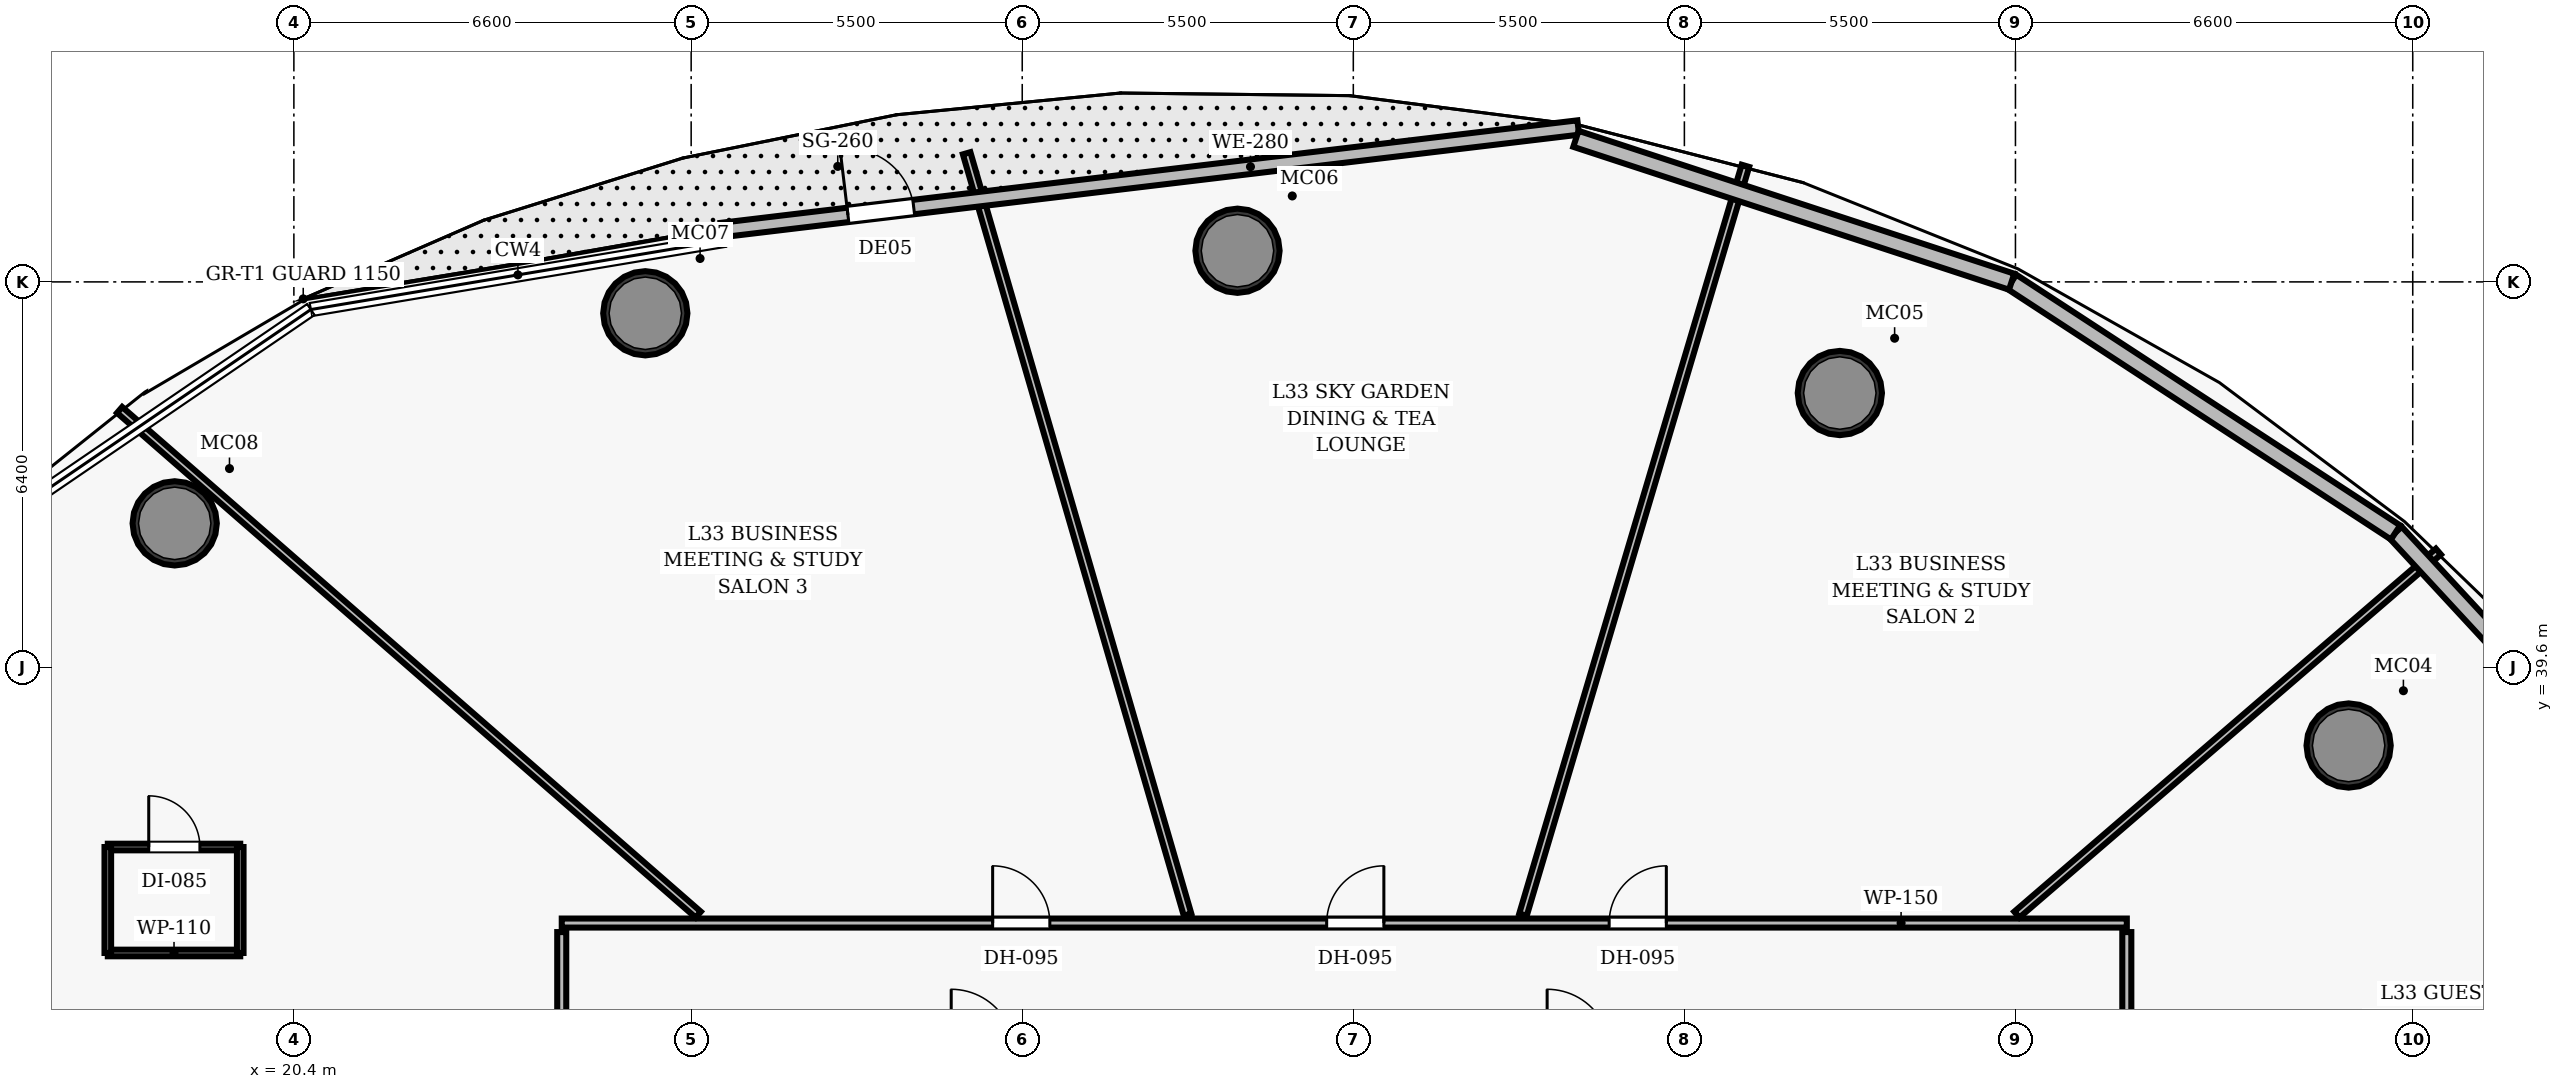
"""IFC4 building model, lengths in metres.
Left out: names, types, materials, properties, quantities, classifications, styles, units other than length and angle.
Written with IfcOpenShell. Run it as: python <this file> out.ifc"""

import sys

from ifc_helpers import new_model, si_unit, direction, frame, frame_2d, origin, origin_2d, place, context, subcontext, project, spatial, rectangle, hollow_circle, extrude, element, fill, save


model = new_model("IFC4")
c1 = context("Model", 3, precision=1e-05, world=origin(), true_north=direction((0.0, 1.0)))
c2 = subcontext(c1, "Body", "Model", "MODEL_VIEW")
j1 = project(units=[si_unit("LENGTHUNIT", "METRE"), si_unit("PLANEANGLEUNIT", "RADIAN")], contexts=[c1])
p1 = place(None, origin())
s1 = spatial("IfcSite", under=j1, at=p1, CompositionType="ELEMENT")
p2 = place(p1, origin())
s2 = spatial("IfcBuilding", under=s1, at=p2, CompositionType="ELEMENT")
p3 = place(p2, frame((0.0, 0.0, 134.3)))
s3 = spatial("IfcBuildingStorey", under=s2, at=p3, CompositionType="ELEMENT", Elevation=134.3)
for number, where, z_axis, x_axis in (
    (1, (54.535, 38.299, 0.0), (0.0, 0.0, 1.0), (1.0, 0.0, 0.0)),
    (2, (46.083, 44.154, 0.0), (0.0, 0.0, 1.0), (1.0, 0.0, 0.0)),
    (3, (36.076, 46.517, 0.0), (0.0, 0.0, 1.0), (1.0, 0.0, 0.0)),
    (4, (26.238, 45.479, 0.0), (0.0, 0.0, 1.0), (1.0, 0.0, 0.0)),
    (5, (18.42, 41.989, 0.0), (0.0, 0.0, 1.0), (1.0, 0.0, 0.0)),
):
    element("IfcColumn", number, at=place(p3, frame(where, z_axis=z_axis, x_axis=x_axis)), inside=s3, PredefinedType="COLUMN", context=c2, shape_type="SweptSolid", body=[
        extrude(hollow_circle(Radius=0.7, WallThickness=0.055, at=origin_2d()), origin(), (0.0, 0.0, 1.0), 3.5),
    ])
p4 = place(p3, frame((24.85, 35.35, 0.0), z_axis=(0.0, 0.0, 1.0), x_axis=(1.0, 0.0, 0.0)))
e6 = element("IfcWall", 6, at=p4, inside=s3, PredefinedType="PARTITIONING", context=c2, shape_type="SweptSolid", body=[
    extrude(rectangle(XDim=26.0, YDim=0.15, at=frame_2d((13.0, 0.0))), origin(), (0.0, 0.0, 1.0), 2.675),
])
p5 = place(p4, frame((17.4, 0.0, 0.0)))
e7 = element("IfcOpeningElement", 7, at=p5, cuts=e6, PredefinedType="OPENING", context=c2, shape_type="SweptSolid", body=[
    extrude(rectangle(XDim=0.95, YDim=2.15, at=frame_2d((0.475, 1.075))), frame((0.0, 0.085, 0.0), z_axis=(0.0, -1.0, 0.0), x_axis=(1.0, 0.0, 0.0)), (0.0, 0.0, 1.0), 0.17),
])
p6 = place(p4, frame((12.708, 0.0, 0.0)))
e8 = element("IfcOpeningElement", 8, at=p6, cuts=e6, PredefinedType="OPENING", context=c2, shape_type="SweptSolid", body=[
    extrude(rectangle(XDim=0.95, YDim=2.15, at=frame_2d((0.475, 1.075))), frame((0.0, 0.085, 0.0), z_axis=(0.0, -1.0, 0.0), x_axis=(1.0, 0.0, 0.0)), (0.0, 0.0, 1.0), 0.17),
])
p7 = place(p4, frame((7.158, 0.0, 0.0)))
e9 = element("IfcOpeningElement", 9, at=p7, cuts=e6, PredefinedType="OPENING", context=c2, shape_type="SweptSolid", body=[
    extrude(rectangle(XDim=0.95, YDim=2.15, at=frame_2d((0.475, 1.075))), frame((0.0, 0.085, 0.0), z_axis=(0.0, -1.0, 0.0), x_axis=(1.0, 0.0, 0.0)), (0.0, 0.0, 1.0), 0.17),
])
p8 = place(p3, frame((24.85, 27.08, 0.0), z_axis=(0.0, 0.0, 1.0), x_axis=(0.0, 1.0, 0.0)))
e10 = element("IfcWall", 10, at=p8, inside=s3, PredefinedType="PARTITIONING", context=c2, shape_type="SweptSolid", body=[
    extrude(rectangle(XDim=8.12, YDim=0.15, at=frame_2d((4.06, 0.0))), origin(), (0.0, 0.0, 1.0), 2.675),
])
p9 = place(p8, frame((3.872, 0.0, 0.0)))
e11 = element("IfcOpeningElement", 11, at=p9, cuts=e10, PredefinedType="OPENING", context=c2, shape_type="SweptSolid", body=[
    extrude(rectangle(XDim=0.95, YDim=2.15, at=frame_2d((0.475, 1.075))), frame((0.0, 0.085, 0.0), z_axis=(0.0, -1.0, 0.0), x_axis=(1.0, 0.0, 0.0)), (0.0, 0.0, 1.0), 0.17),
])
p10 = place(p3, frame((50.85, 27.08, 0.0), z_axis=(0.0, 0.0, 1.0), x_axis=(0.0, 1.0, 0.0)))
e12 = element("IfcWall", 12, at=p10, inside=s3, PredefinedType="PARTITIONING", context=c2, shape_type="SweptSolid", body=[
    extrude(rectangle(XDim=8.12, YDim=0.15, at=frame_2d((4.06, 0.0))), origin(), (0.0, 0.0, 1.0), 2.675),
])
p11 = place(p10, frame((1.89, 0.0, 0.0)))
e13 = element("IfcOpeningElement", 13, at=p11, cuts=e12, PredefinedType="OPENING", context=c2, shape_type="SweptSolid", body=[
    extrude(rectangle(XDim=0.95, YDim=2.15, at=frame_2d((0.475, 1.075))), frame((0.0, 0.085, 0.0), z_axis=(0.0, -1.0, 0.0), x_axis=(1.0, 0.0, 0.0)), (0.0, 0.0, 1.0), 0.17),
])
p12 = place(p3, frame((49.022, 35.49, 0.0), z_axis=(0.0, 0.0, 1.0), x_axis=(0.757817057359, 0.652467093098, 0.0)))
e14 = element("IfcWall", 14, at=p12, inside=s3, PredefinedType="PARTITIONING", context=c2, shape_type="SweptSolid", body=[
    extrude(rectangle(XDim=9.242, YDim=0.13, at=frame_2d((4.621, 0.0))), origin(), (0.0, 0.0, 1.0), 2.675),
])
p13 = place(p3, frame((40.819, 35.49, 0.0), z_axis=(0.0, 0.0, 1.0), x_axis=(0.284778226814, 0.958593428693, 0.0)))
e15 = element("IfcWall", 15, at=p13, inside=s3, PredefinedType="PARTITIONING", context=c2, shape_type="SweptSolid", body=[
    extrude(rectangle(XDim=12.975, YDim=0.13, at=frame_2d((6.488, 0.0))), origin(), (0.0, 0.0, 1.0), 2.675),
])
p14 = place(p3, frame((35.246, 35.49, 0.0), z_axis=(0.0, 0.0, 1.0), x_axis=(-0.27866844054, 0.960387369892, 0.0)))
e16 = element("IfcWall", 16, at=p14, inside=s3, PredefinedType="PARTITIONING", context=c2, shape_type="SweptSolid", body=[
    extrude(rectangle(XDim=13.169, YDim=0.13, at=frame_2d((6.584, 0.0))), origin(), (0.0, 0.0, 1.0), 2.675),
])
p15 = place(p3, frame((27.118, 35.49, 0.0), z_axis=(0.0, 0.0, 1.0), x_axis=(-0.753667699891, 0.657255656606, 0.0)))
e17 = element("IfcWall", 17, at=p15, inside=s3, PredefinedType="PARTITIONING", context=c2, shape_type="SweptSolid", body=[
    extrude(rectangle(XDim=12.755, YDim=0.13, at=frame_2d((6.377, 0.0))), origin(), (0.0, 0.0, 1.0), 2.675),
])
p16 = place(p3, frame((17.309, 34.853, 0.0), z_axis=(0.0, 0.0, 1.0), x_axis=(1.0, 0.0, 0.0)))
e18 = element("IfcWall", 18, at=p16, inside=s3, PredefinedType="PARTITIONING", context=c2, shape_type="SweptSolid", body=[
    extrude(rectangle(XDim=2.2, YDim=0.11, at=frame_2d((1.1, 0.0))), origin(), (0.0, 0.0, 1.0), 2.675),
])
p17 = place(p3, frame((17.309, 36.613, 0.0), z_axis=(0.0, 0.0, 1.0), x_axis=(1.0, 0.0, 0.0)))
e19 = element("IfcWall", 19, at=p17, inside=s3, PredefinedType="PARTITIONING", context=c2, shape_type="SweptSolid", body=[
    extrude(rectangle(XDim=2.2, YDim=0.11, at=frame_2d((1.1, 0.0))), origin(), (0.0, 0.0, 1.0), 2.675),
])
p18 = place(p17, frame((0.68, 0.0, 0.0)))
e20 = element("IfcOpeningElement", 20, at=p18, cuts=e19, PredefinedType="OPENING", context=c2, shape_type="SweptSolid", body=[
    extrude(rectangle(XDim=0.85, YDim=2.1, at=frame_2d((0.425, 1.05))), frame((0.0, 0.065, 0.0), z_axis=(0.0, -1.0, 0.0), x_axis=(1.0, 0.0, 0.0)), (0.0, 0.0, 1.0), 0.13),
])
for number, where, z_axis, x_axis in (
    (21, (17.309, 34.853, 0.0), (0.0, 0.0, 1.0), (0.0, 1.0, 0.0)),
    (22, (19.509, 34.853, 0.0), (0.0, 0.0, 1.0), (0.0, 1.0, 0.0)),
):
    element("IfcWall", number, at=place(p3, frame(where, z_axis=z_axis, x_axis=x_axis)), inside=s3, PredefinedType="PARTITIONING", context=c2, shape_type="SweptSolid", body=[
        extrude(rectangle(XDim=1.76, YDim=0.11, at=frame_2d((0.88, 0.0))), origin(), (0.0, 0.0, 1.0), 2.675),
    ])
p19 = place(p3, frame((27.501, 46.861, 0.0), z_axis=(0.0, 0.0, 1.0), x_axis=(0.992918999128, 0.118793354907, 0.0)))
e23 = element("IfcWall", 23, at=p19, inside=s3, PredefinedType="SOLIDWALL", context=c2, shape_type="SweptSolid", body=[
    extrude(rectangle(XDim=14.337, YDim=0.24, at=frame_2d((7.168, 0.0))), origin(), (0.0, 0.0, 1.0), 2.45),
])
p20 = place(p19, frame((2.118, 0.0, 0.0)))
e24 = element("IfcOpeningElement", 24, at=p20, cuts=e23, PredefinedType="OPENING", context=c2, shape_type="SweptSolid", body=[
    extrude(rectangle(XDim=1.1, YDim=2.2, at=frame_2d((0.55, 1.1))), frame((0.0, 0.13, 0.0), z_axis=(0.0, -1.0, 0.0), x_axis=(1.0, 0.0, 0.0)), (0.0, 0.0, 1.0), 0.26),
])
p21 = place(p3, frame((55.314, 41.838, 0.0), z_axis=(0.0, 0.0, 1.0), x_axis=(0.678806416745, -0.734317266981, 0.0)))
e25 = element("IfcWall", 25, at=p21, inside=s3, PredefinedType="SOLIDWALL", context=c2, shape_type="SweptSolid", body=[
    extrude(rectangle(XDim=7.569, YDim=0.28, at=frame_2d((3.785, 0.0))), origin(), (0.0, 0.0, 1.0), 3.26),
])
p22 = place(p3, frame((48.937, 46.003, 0.0), z_axis=(0.0, 0.0, 1.0), x_axis=(0.837254633375, -0.546813202925, 0.0)))
e26 = element("IfcWall", 26, at=p22, inside=s3, PredefinedType="SOLIDWALL", context=c2, shape_type="SweptSolid", body=[
    extrude(rectangle(XDim=7.617, YDim=0.28, at=frame_2d((3.809, 0.0))), origin(), (0.0, 0.0, 1.0), 3.26),
])
p23 = place(p3, frame((41.698, 48.377, 0.0), z_axis=(0.0, 0.0, 1.0), x_axis=(0.950229385432, -0.311551143573, 0.0)))
e27 = element("IfcWall", 27, at=p23, inside=s3, PredefinedType="SOLIDWALL", context=c2, shape_type="SweptSolid", body=[
    extrude(rectangle(XDim=7.618, YDim=0.28, at=frame_2d((3.809, 0.0))), origin(), (0.0, 0.0, 1.0), 3.26),
])
p24 = place(p5, origin())
e28 = element("IfcDoor", 28, at=p24, inside=s3, OperationType="SINGLE_SWING_RIGHT", PredefinedType="DOOR", context=c2, shape_type="SweptSolid", body=[
    extrude(rectangle(XDim=0.95, YDim=2.15, at=frame_2d((0.475, 1.075))), frame((0.0, 0.025, 0.0), z_axis=(0.0, -1.0, 0.0), x_axis=(1.0, 0.0, 0.0)), (0.0, 0.0, 1.0), 0.05),
])
fill(e7, e28)
p25 = place(p6, origin())
e29 = element("IfcDoor", 29, at=p25, inside=s3, OperationType="SINGLE_SWING_RIGHT", PredefinedType="DOOR", context=c2, shape_type="SweptSolid", body=[
    extrude(rectangle(XDim=0.95, YDim=2.15, at=frame_2d((0.475, 1.075))), frame((0.0, 0.025, 0.0), z_axis=(0.0, -1.0, 0.0), x_axis=(1.0, 0.0, 0.0)), (0.0, 0.0, 1.0), 0.05),
])
fill(e8, e29)
p26 = place(p7, origin())
e30 = element("IfcDoor", 30, at=p26, inside=s3, OperationType="SINGLE_SWING_LEFT", PredefinedType="DOOR", context=c2, shape_type="SweptSolid", body=[
    extrude(rectangle(XDim=0.95, YDim=2.15, at=frame_2d((0.475, 1.075))), frame((0.0, 0.025, 0.0), z_axis=(0.0, -1.0, 0.0), x_axis=(1.0, 0.0, 0.0)), (0.0, 0.0, 1.0), 0.05),
])
fill(e9, e30)
p27 = place(p18, origin())
e31 = element("IfcDoor", 31, at=p27, inside=s3, OperationType="SINGLE_SWING_LEFT", PredefinedType="DOOR", context=c2, shape_type="SweptSolid", body=[
    extrude(rectangle(XDim=0.85, YDim=2.1, at=frame_2d((0.425, 1.05))), frame((0.0, 0.025, 0.0), z_axis=(0.0, -1.0, 0.0), x_axis=(1.0, 0.0, 0.0)), (0.0, 0.0, 1.0), 0.05),
])
fill(e20, e31)
p28 = place(p20, origin())
e32 = element("IfcDoor", 32, at=p28, inside=s3, OperationType="SINGLE_SWING_LEFT", PredefinedType="DOOR", context=c2, shape_type="SweptSolid", body=[
    extrude(rectangle(XDim=1.1, YDim=2.2, at=frame_2d((0.55, 1.1))), frame((0.0, 0.025, 0.0), z_axis=(0.0, -1.0, 0.0), x_axis=(1.0, 0.0, 0.0)), (0.0, 0.0, 1.0), 0.05),
])
fill(e24, e32)
save(model, sys.argv[1])
